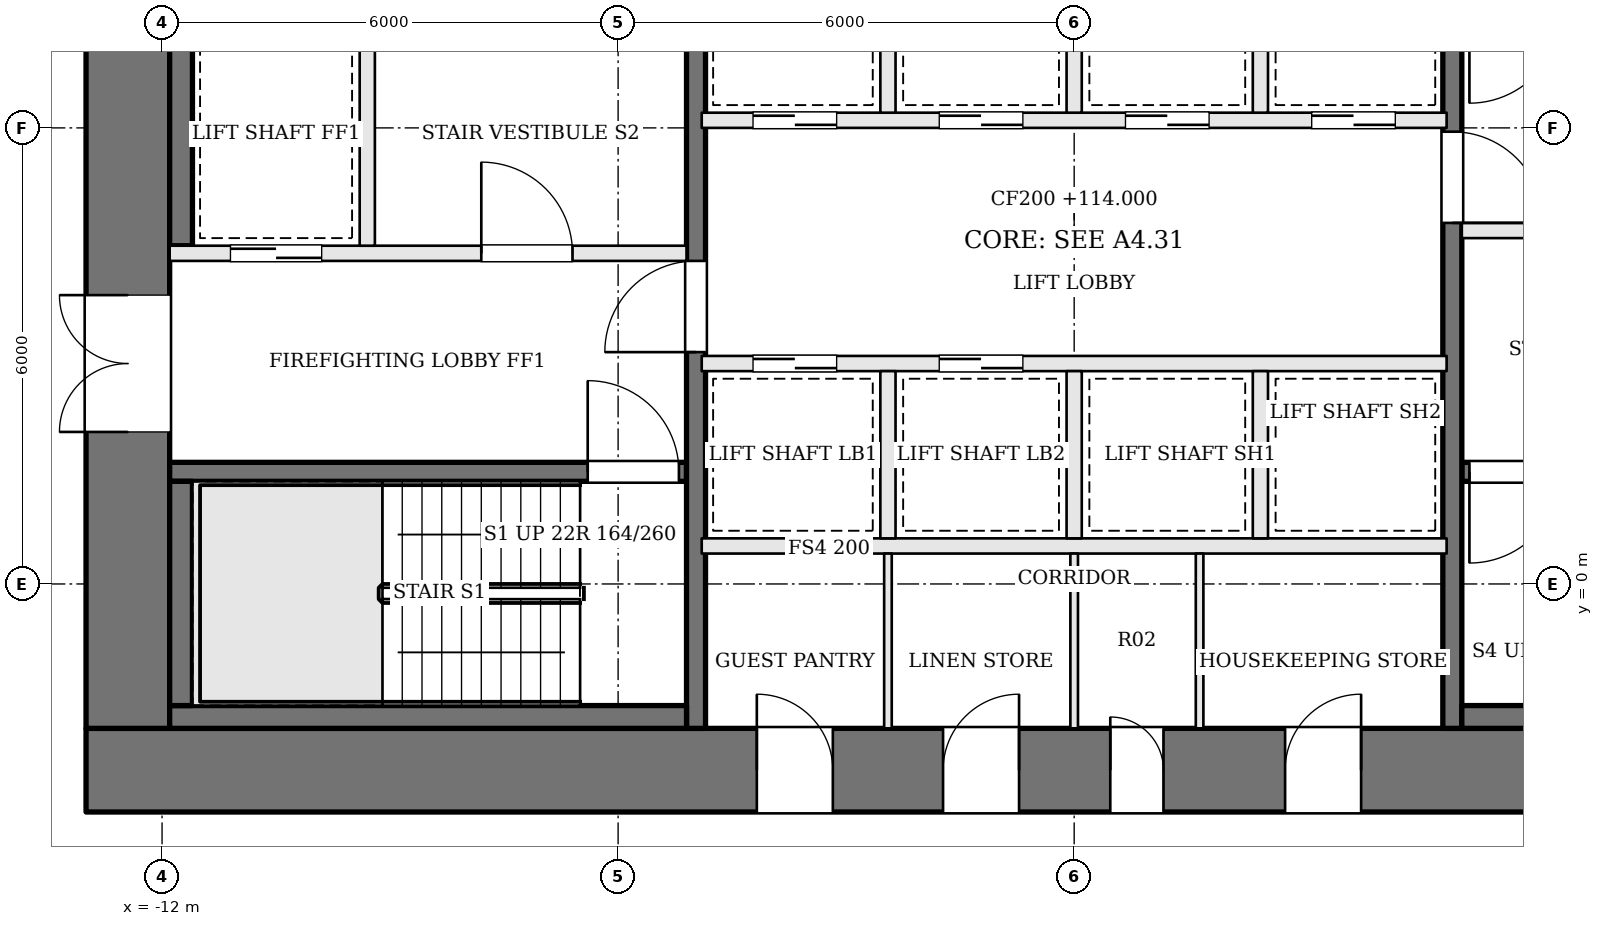
"""IFC4 building model, lengths in metres.
Left out: names, types, materials, properties, quantities, classifications, styles, units other than length and angle.
Written with IfcOpenShell. Run it as: python <this file> out.ifc"""

import sys

from ifc_helpers import new_model, si_unit, direction, frame, frame_2d, origin, place, context, subcontext, project, spatial, rectangle, extrude, element, fill, save


model = new_model("IFC4")
c1 = context("Model", 3, precision=1e-05, world=origin(), true_north=direction((0.0, 1.0)))
c2 = subcontext(c1, "Body", "Model", "MODEL_VIEW")
j1 = project(units=[si_unit("LENGTHUNIT", "METRE"), si_unit("PLANEANGLEUNIT", "RADIAN")], contexts=[c1])
p1 = place(None, origin())
s1 = spatial("IfcSite", under=j1, at=p1, CompositionType="ELEMENT")
p2 = place(p1, origin())
s2 = spatial("IfcBuilding", under=s1, at=p2, CompositionType="ELEMENT")
p3 = place(p2, frame((0.0, 0.0, 114.0)))
s3 = spatial("IfcBuildingStorey", under=s2, at=p3, CompositionType="ELEMENT", Elevation=114.0)
p4 = place(p3, frame((-13.0, -2.45, 0.0), z_axis=(0.0, 0.0, 1.0), x_axis=(1.0, 0.0, 0.0)))
e1 = element("IfcWall", 1, at=p4, inside=s3, PredefinedType="SHEAR", context=c2, shape_type="SweptSolid", body=[
    extrude(rectangle(XDim=26.0, YDim=1.1, at=frame_2d((13.0, 0.0))), origin(), (0.0, 0.0, 1.0), 3.6),
])
p5 = place(p4, frame((8.825, 0.0, 0.0)))
e2 = element("IfcOpeningElement", 2, at=p5, cuts=e1, PredefinedType="OPENING", context=c2, shape_type="SweptSolid", body=[
    extrude(rectangle(XDim=1.0, YDim=2.1, at=frame_2d((0.5, 1.05))), frame((0.0, 0.56, 0.0), z_axis=(0.0, -1.0, 0.0), x_axis=(1.0, 0.0, 0.0)), (0.0, 0.0, 1.0), 1.12),
])
p6 = place(p4, frame((11.275, 0.0, 0.0)))
e3 = element("IfcOpeningElement", 3, at=p6, cuts=e1, PredefinedType="OPENING", context=c2, shape_type="SweptSolid", body=[
    extrude(rectangle(XDim=1.0, YDim=2.1, at=frame_2d((0.5, 1.05))), frame((0.0, 0.56, 0.0), z_axis=(0.0, -1.0, 0.0), x_axis=(1.0, 0.0, 0.0)), (0.0, 0.0, 1.0), 1.12),
])
p7 = place(p4, frame((13.475, 0.0, 0.0)))
e4 = element("IfcOpeningElement", 4, at=p7, cuts=e1, PredefinedType="OPENING", context=c2, shape_type="SweptSolid", body=[
    extrude(rectangle(XDim=0.7, YDim=2.1, at=frame_2d((0.35, 1.05))), frame((0.0, 0.56, 0.0), z_axis=(0.0, -1.0, 0.0), x_axis=(1.0, 0.0, 0.0)), (0.0, 0.0, 1.0), 1.12),
])
p8 = place(p4, frame((15.775, 0.0, 0.0)))
e5 = element("IfcOpeningElement", 5, at=p8, cuts=e1, PredefinedType="OPENING", context=c2, shape_type="SweptSolid", body=[
    extrude(rectangle(XDim=1.0, YDim=2.1, at=frame_2d((0.5, 1.05))), frame((0.0, 0.56, 0.0), z_axis=(0.0, -1.0, 0.0), x_axis=(1.0, 0.0, 0.0)), (0.0, 0.0, 1.0), 1.12),
])
p9 = place(p3, frame((-12.45, -1.9, 0.0), z_axis=(0.0, 0.0, 1.0), x_axis=(0.0, 1.0, 0.0)))
e6 = element("IfcWall", 6, at=p9, inside=s3, PredefinedType="SHEAR", context=c2, shape_type="SweptSolid", body=[
    extrude(rectangle(XDim=12.8, YDim=1.1, at=frame_2d((6.4, 0.0))), origin(), (0.0, 0.0, 1.0), 3.6),
])
p10 = place(p9, frame((3.9, 0.0, 0.0)))
e7 = element("IfcOpeningElement", 7, at=p10, cuts=e6, PredefinedType="OPENING", context=c2, shape_type="SweptSolid", body=[
    extrude(rectangle(XDim=1.8, YDim=2.1, at=frame_2d((0.9, 1.05))), frame((0.0, 0.56, 0.0), z_axis=(0.0, -1.0, 0.0), x_axis=(1.0, 0.0, 0.0)), (0.0, 0.0, 1.0), 1.12),
])
p11 = place(p3, frame((-11.9, 1.475, 0.0), z_axis=(0.0, 0.0, 1.0), x_axis=(1.0, 0.0, 0.0)))
e8 = element("IfcWall", 8, at=p11, inside=s3, PredefinedType="SOLIDWALL", context=c2, shape_type="SweptSolid", body=[
    extrude(rectangle(XDim=6.8, YDim=0.25, at=frame_2d((3.4, 0.0))), origin(), (0.0, 0.0, 1.0), 3.4),
])
p12 = place(p11, frame((5.5, 0.0, 0.0)))
e9 = element("IfcOpeningElement", 9, at=p12, cuts=e8, PredefinedType="OPENING", context=c2, shape_type="SweptSolid", body=[
    extrude(rectangle(XDim=1.2, YDim=2.1, at=frame_2d((0.6, 1.05))), frame((0.0, 0.135, 0.0), z_axis=(0.0, -1.0, 0.0), x_axis=(1.0, 0.0, 0.0)), (0.0, 0.0, 1.0), 0.27),
])
p13 = place(p3, frame((-11.9, 4.35, 0.0), z_axis=(0.0, 0.0, 1.0), x_axis=(1.0, 0.0, 0.0)))
e10 = element("IfcWall", 10, at=p13, inside=s3, PredefinedType="SOLIDWALL", context=c2, shape_type="SweptSolid", body=[
    extrude(rectangle(XDim=6.8, YDim=0.2, at=frame_2d((3.4, 0.0))), origin(), (0.0, 0.0, 1.0), 3.4),
])
p14 = place(p13, frame((4.1, 0.0, 0.0)))
e11 = element("IfcOpeningElement", 11, at=p14, cuts=e10, PredefinedType="OPENING", context=c2, shape_type="SweptSolid", body=[
    extrude(rectangle(XDim=1.2, YDim=2.1, at=frame_2d((0.6, 1.05))), frame((0.0, 0.11, 0.0), z_axis=(0.0, -1.0, 0.0), x_axis=(1.0, 0.0, 0.0)), (0.0, 0.0, 1.0), 0.22),
])
p15 = place(p13, frame((0.8, 0.0, 0.0)))
e12 = element("IfcOpeningElement", 12, at=p15, cuts=e10, PredefinedType="OPENING", context=c2, shape_type="SweptSolid", body=[
    extrude(rectangle(XDim=1.2, YDim=2.1, at=frame_2d((0.6, 1.05))), frame((0.0, 0.11, 0.0), z_axis=(0.0, -1.0, 0.0), x_axis=(1.0, 0.0, 0.0)), (0.0, 0.0, 1.0), 0.22),
])
p16 = place(p3, frame((11.9, 4.65, 0.0), z_axis=(0.0, 0.0, 1.0), x_axis=(-1.0, 0.0, 0.0)))
e13 = element("IfcWall", 13, at=p16, inside=s3, PredefinedType="SOLIDWALL", context=c2, shape_type="SweptSolid", body=[
    extrude(rectangle(XDim=6.8, YDim=0.2, at=frame_2d((3.4, 0.0))), origin(), (0.0, 0.0, 1.0), 3.4),
])
p17 = place(p16, frame((4.1, 0.0, 0.0)))
e14 = element("IfcOpeningElement", 14, at=p17, cuts=e13, PredefinedType="OPENING", context=c2, shape_type="SweptSolid", body=[
    extrude(rectangle(XDim=1.2, YDim=2.1, at=frame_2d((0.6, 1.05))), frame((0.0, 0.11, 0.0), z_axis=(0.0, -1.0, 0.0), x_axis=(1.0, 0.0, 0.0)), (0.0, 0.0, 1.0), 0.22),
])
p18 = place(p16, frame((0.8, 0.0, 0.0)))
e15 = element("IfcOpeningElement", 15, at=p18, cuts=e13, PredefinedType="OPENING", context=c2, shape_type="SweptSolid", body=[
    extrude(rectangle(XDim=1.2, YDim=2.1, at=frame_2d((0.6, 1.05))), frame((0.0, 0.11, 0.0), z_axis=(0.0, -1.0, 0.0), x_axis=(1.0, 0.0, 0.0)), (0.0, 0.0, 1.0), 0.22),
])
p19 = place(p3, frame((11.9, 1.475, 0.0), z_axis=(0.0, 0.0, 1.0), x_axis=(-1.0, 0.0, 0.0)))
e16 = element("IfcWall", 16, at=p19, inside=s3, PredefinedType="SOLIDWALL", context=c2, shape_type="SweptSolid", body=[
    extrude(rectangle(XDim=6.8, YDim=0.25, at=frame_2d((3.4, 0.0))), origin(), (0.0, 0.0, 1.0), 3.4),
])
p20 = place(p19, frame((5.5, 0.0, 0.0)))
e17 = element("IfcOpeningElement", 17, at=p20, cuts=e16, PredefinedType="OPENING", context=c2, shape_type="SweptSolid", body=[
    extrude(rectangle(XDim=1.2, YDim=2.1, at=frame_2d((0.6, 1.05))), frame((0.0, 0.135, 0.0), z_axis=(0.0, -1.0, 0.0), x_axis=(1.0, 0.0, 0.0)), (0.0, 0.0, 1.0), 0.27),
])
p21 = place(p3, frame((-9.3, 4.45, 0.0), z_axis=(0.0, 0.0, 1.0), x_axis=(0.0, 1.0, 0.0)))
e18 = element("IfcWall", 18, at=p21, inside=s3, PredefinedType="SOLIDWALL", context=c2, shape_type="SweptSolid", body=[
    extrude(rectangle(XDim=3.0, YDim=0.2, at=frame_2d((1.5, 0.0))), origin(), (0.0, 0.0, 1.0), 3.4),
])
p22 = place(p3, frame((-4.975, -1.9, 0.0), z_axis=(0.0, 0.0, 1.0), x_axis=(0.0, 1.0, 0.0)))
e19 = element("IfcWall", 19, at=p22, inside=s3, PredefinedType="SOLIDWALL", context=c2, shape_type="SweptSolid", body=[
    extrude(rectangle(XDim=12.8, YDim=0.25, at=frame_2d((6.4, 0.0))), origin(), (0.0, 0.0, 1.0), 3.4),
])
p23 = place(p22, frame((4.95, 0.0, 0.0)))
e20 = element("IfcOpeningElement", 20, at=p23, cuts=e19, PredefinedType="OPENING", context=c2, shape_type="SweptSolid", body=[
    extrude(rectangle(XDim=1.2, YDim=2.1, at=frame_2d((0.6, 1.05))), frame((0.0, 0.135, 0.0), z_axis=(0.0, -1.0, 0.0), x_axis=(1.0, 0.0, 0.0)), (0.0, 0.0, 1.0), 0.27),
])
p24 = place(p3, frame((4.975, 10.9, 0.0), z_axis=(0.0, 0.0, 1.0), x_axis=(0.0, -1.0, 0.0)))
e21 = element("IfcWall", 21, at=p24, inside=s3, PredefinedType="SOLIDWALL", context=c2, shape_type="SweptSolid", body=[
    extrude(rectangle(XDim=12.8, YDim=0.25, at=frame_2d((6.4, 0.0))), origin(), (0.0, 0.0, 1.0), 3.4),
])
p25 = place(p24, frame((4.95, 0.0, 0.0)))
e22 = element("IfcOpeningElement", 22, at=p25, cuts=e21, PredefinedType="OPENING", context=c2, shape_type="SweptSolid", body=[
    extrude(rectangle(XDim=1.2, YDim=2.1, at=frame_2d((0.6, 1.05))), frame((0.0, 0.135, 0.0), z_axis=(0.0, -1.0, 0.0), x_axis=(1.0, 0.0, 0.0)), (0.0, 0.0, 1.0), 0.27),
])
p26 = place(p3, frame((-11.9, -1.75, 0.0), z_axis=(0.0, 0.0, 1.0), x_axis=(1.0, 0.0, 0.0)))
e23 = element("IfcWall", 23, at=p26, inside=s3, PredefinedType="SOLIDWALL", context=c2, shape_type="SweptSolid", body=[
    extrude(rectangle(XDim=6.8, YDim=0.3, at=frame_2d((3.4, 0.0))), origin(), (0.0, 0.0, 1.0), 3.4),
])
p27 = place(p3, frame((-11.75, -1.6, 0.0), z_axis=(0.0, 0.0, 1.0), x_axis=(0.0, 1.0, 0.0)))
e24 = element("IfcWall", 24, at=p27, inside=s3, PredefinedType="SOLIDWALL", context=c2, shape_type="SweptSolid", body=[
    extrude(rectangle(XDim=2.95, YDim=0.3, at=frame_2d((1.475, 0.0))), origin(), (0.0, 0.0, 1.0), 3.4),
])
p28 = place(p3, frame((-11.75, 4.45, 0.0), z_axis=(0.0, 0.0, 1.0), x_axis=(0.0, 1.0, 0.0)))
e25 = element("IfcWall", 25, at=p28, inside=s3, PredefinedType="SOLIDWALL", context=c2, shape_type="SweptSolid", body=[
    extrude(rectangle(XDim=3.0, YDim=0.3, at=frame_2d((1.5, 0.0))), origin(), (0.0, 0.0, 1.0), 3.4),
])
p29 = place(p3, frame((11.9, -1.75, 0.0), z_axis=(0.0, 0.0, 1.0), x_axis=(-1.0, 0.0, 0.0)))
e26 = element("IfcWall", 26, at=p29, inside=s3, PredefinedType="SOLIDWALL", context=c2, shape_type="SweptSolid", body=[
    extrude(rectangle(XDim=6.8, YDim=0.3, at=frame_2d((3.4, 0.0))), origin(), (0.0, 0.0, 1.0), 3.4),
])
p30 = place(p3, frame((-4.9, 0.5, 0.0), z_axis=(0.0, 0.0, 1.0), x_axis=(1.0, 0.0, 0.0)))
e27 = element("IfcWall", 27, at=p30, inside=s3, PredefinedType="SOLIDWALL", context=c2, shape_type="SweptSolid", body=[
    extrude(rectangle(XDim=9.8, YDim=0.2, at=frame_2d((4.9, 0.0))), origin(), (0.0, 0.0, 1.0), 3.4),
])
p31 = place(p3, frame((-4.9, 2.9, 0.0), z_axis=(0.0, 0.0, 1.0), x_axis=(1.0, 0.0, 0.0)))
e28 = element("IfcWall", 28, at=p31, inside=s3, PredefinedType="SOLIDWALL", context=c2, shape_type="SweptSolid", body=[
    extrude(rectangle(XDim=9.8, YDim=0.2, at=frame_2d((4.9, 0.0))), origin(), (0.0, 0.0, 1.0), 3.4),
])
p32 = place(p31, frame((0.675, 0.0, 0.0)))
e29 = element("IfcOpeningElement", 29, at=p32, cuts=e28, PredefinedType="OPENING", context=c2, shape_type="SweptSolid", body=[
    extrude(rectangle(XDim=1.1, YDim=2.1, at=frame_2d((0.55, 1.05))), frame((0.0, 0.11, 0.0), z_axis=(0.0, -1.0, 0.0), x_axis=(1.0, 0.0, 0.0)), (0.0, 0.0, 1.0), 0.22),
])
p33 = place(p31, frame((3.125, 0.0, 0.0)))
e30 = element("IfcOpeningElement", 30, at=p33, cuts=e28, PredefinedType="OPENING", context=c2, shape_type="SweptSolid", body=[
    extrude(rectangle(XDim=1.1, YDim=2.1, at=frame_2d((0.55, 1.05))), frame((0.0, 0.11, 0.0), z_axis=(0.0, -1.0, 0.0), x_axis=(1.0, 0.0, 0.0)), (0.0, 0.0, 1.0), 0.22),
])
p34 = place(p3, frame((-4.9, 6.1, 0.0), z_axis=(0.0, 0.0, 1.0), x_axis=(1.0, 0.0, 0.0)))
e31 = element("IfcWall", 31, at=p34, inside=s3, PredefinedType="SOLIDWALL", context=c2, shape_type="SweptSolid", body=[
    extrude(rectangle(XDim=9.8, YDim=0.2, at=frame_2d((4.9, 0.0))), origin(), (0.0, 0.0, 1.0), 3.4),
])
p35 = place(p34, frame((0.675, 0.0, 0.0)))
e32 = element("IfcOpeningElement", 32, at=p35, cuts=e31, PredefinedType="OPENING", context=c2, shape_type="SweptSolid", body=[
    extrude(rectangle(XDim=1.1, YDim=2.1, at=frame_2d((0.55, 1.05))), frame((0.0, 0.11, 0.0), z_axis=(0.0, -1.0, 0.0), x_axis=(1.0, 0.0, 0.0)), (0.0, 0.0, 1.0), 0.22),
])
p36 = place(p34, frame((3.125, 0.0, 0.0)))
e33 = element("IfcOpeningElement", 33, at=p36, cuts=e31, PredefinedType="OPENING", context=c2, shape_type="SweptSolid", body=[
    extrude(rectangle(XDim=1.1, YDim=2.1, at=frame_2d((0.55, 1.05))), frame((0.0, 0.11, 0.0), z_axis=(0.0, -1.0, 0.0), x_axis=(1.0, 0.0, 0.0)), (0.0, 0.0, 1.0), 0.22),
])
p37 = place(p34, frame((5.575, 0.0, 0.0)))
e34 = element("IfcOpeningElement", 34, at=p37, cuts=e31, PredefinedType="OPENING", context=c2, shape_type="SweptSolid", body=[
    extrude(rectangle(XDim=1.1, YDim=2.1, at=frame_2d((0.55, 1.05))), frame((0.0, 0.11, 0.0), z_axis=(0.0, -1.0, 0.0), x_axis=(1.0, 0.0, 0.0)), (0.0, 0.0, 1.0), 0.22),
])
p38 = place(p34, frame((8.025, 0.0, 0.0)))
e35 = element("IfcOpeningElement", 35, at=p38, cuts=e31, PredefinedType="OPENING", context=c2, shape_type="SweptSolid", body=[
    extrude(rectangle(XDim=1.1, YDim=2.1, at=frame_2d((0.55, 1.05))), frame((0.0, 0.11, 0.0), z_axis=(0.0, -1.0, 0.0), x_axis=(1.0, 0.0, 0.0)), (0.0, 0.0, 1.0), 0.22),
])
for number, where, z_axis, x_axis in (
    (36, (-2.45, 0.6, 0.0), (0.0, 0.0, 1.0), (0.0, 1.0, 0.0)),
    (37, (0.0, 0.6, 0.0), (0.0, 0.0, 1.0), (0.0, 1.0, 0.0)),
    (38, (2.45, 0.6, 0.0), (0.0, 0.0, 1.0), (0.0, 1.0, 0.0)),
    (39, (-2.45, 6.2, 0.0), (0.0, 0.0, 1.0), (0.0, 1.0, 0.0)),
    (40, (0.0, 6.2, 0.0), (0.0, 0.0, 1.0), (0.0, 1.0, 0.0)),
    (41, (2.45, 6.2, 0.0), (0.0, 0.0, 1.0), (0.0, 1.0, 0.0)),
):
    element("IfcWall", number, at=place(p3, frame(where, z_axis=z_axis, x_axis=x_axis)), inside=s3, PredefinedType="SOLIDWALL", context=c2, shape_type="SweptSolid", body=[
        extrude(rectangle(XDim=2.2, YDim=0.2, at=frame_2d((1.1, 0.0))), origin(), (0.0, 0.0, 1.0), 3.4),
    ])
for number, where, z_axis, x_axis in (
    (42, (-2.45, -1.9, 0.0), (0.0, 0.0, 1.0), (0.0, 1.0, 0.0)),
    (43, (0.0, -1.9, 0.0), (0.0, 0.0, 1.0), (0.0, 1.0, 0.0)),
    (44, (1.65, -1.9, 0.0), (0.0, 0.0, 1.0), (0.0, 1.0, 0.0)),
):
    element("IfcWall", number, at=place(p3, frame(where, z_axis=z_axis, x_axis=x_axis)), inside=s3, PredefinedType="PARTITIONING", context=c2, shape_type="SweptSolid", body=[
        extrude(rectangle(XDim=2.3, YDim=0.1, at=frame_2d((1.15, 0.0))), origin(), (0.0, 0.0, 1.0), 3.4),
    ])
p39 = place(p10, origin())
e45 = element("IfcDoor", 45, at=p39, inside=s3, OperationType="DOUBLE_DOOR_SINGLE_SWING", PredefinedType="DOOR", context=c2, shape_type="SweptSolid", body=[
    extrude(rectangle(XDim=1.8, YDim=2.1, at=frame_2d((0.9, 1.05))), frame((0.0, 0.025, 0.0), z_axis=(0.0, -1.0, 0.0), x_axis=(1.0, 0.0, 0.0)), (0.0, 0.0, 1.0), 0.05),
])
fill(e7, e45)
p40 = place(p23, origin())
e46 = element("IfcDoor", 46, at=p40, inside=s3, OperationType="SINGLE_SWING_LEFT", PredefinedType="DOOR", context=c2, shape_type="SweptSolid", body=[
    extrude(rectangle(XDim=1.2, YDim=2.1, at=frame_2d((0.6, 1.05))), frame((0.0, 0.025, 0.0), z_axis=(0.0, -1.0, 0.0), x_axis=(1.0, 0.0, 0.0)), (0.0, 0.0, 1.0), 0.05),
])
fill(e20, e46)
p41 = place(p25, origin())
e47 = element("IfcDoor", 47, at=p41, inside=s3, OperationType="SINGLE_SWING_RIGHT", PredefinedType="DOOR", context=c2, shape_type="SweptSolid", body=[
    extrude(rectangle(XDim=1.2, YDim=2.1, at=frame_2d((0.6, 1.05))), frame((0.0, 0.025, 0.0), z_axis=(0.0, -1.0, 0.0), x_axis=(1.0, 0.0, 0.0)), (0.0, 0.0, 1.0), 0.05),
])
fill(e22, e47)
p42 = place(p14, origin())
e48 = element("IfcDoor", 48, at=p42, inside=s3, OperationType="SINGLE_SWING_LEFT", PredefinedType="DOOR", context=c2, shape_type="SweptSolid", body=[
    extrude(rectangle(XDim=1.2, YDim=2.1, at=frame_2d((0.6, 1.05))), frame((0.0, 0.025, 0.0), z_axis=(0.0, -1.0, 0.0), x_axis=(1.0, 0.0, 0.0)), (0.0, 0.0, 1.0), 0.05),
])
fill(e11, e48)
p43 = place(p12, origin())
e49 = element("IfcDoor", 49, at=p43, inside=s3, OperationType="SINGLE_SWING_LEFT", PredefinedType="DOOR", context=c2, shape_type="SweptSolid", body=[
    extrude(rectangle(XDim=1.2, YDim=2.1, at=frame_2d((0.6, 1.05))), frame((0.0, 0.025, 0.0), z_axis=(0.0, -1.0, 0.0), x_axis=(1.0, 0.0, 0.0)), (0.0, 0.0, 1.0), 0.05),
])
fill(e9, e49)
p44 = place(p20, origin())
e50 = element("IfcDoor", 50, at=p44, inside=s3, OperationType="SINGLE_SWING_RIGHT", PredefinedType="DOOR", context=c2, shape_type="SweptSolid", body=[
    extrude(rectangle(XDim=1.2, YDim=2.1, at=frame_2d((0.6, 1.05))), frame((0.0, 0.025, 0.0), z_axis=(0.0, -1.0, 0.0), x_axis=(1.0, 0.0, 0.0)), (0.0, 0.0, 1.0), 0.05),
])
fill(e17, e50)
p45 = place(p15, origin())
e51 = element("IfcDoor", 51, at=p45, inside=s3, OperationType="SLIDING_TO_RIGHT", PredefinedType="DOOR", context=c2, shape_type="SweptSolid", body=[
    extrude(rectangle(XDim=1.2, YDim=2.1, at=frame_2d((0.6, 1.05))), frame((0.0, 0.025, 0.0), z_axis=(0.0, -1.0, 0.0), x_axis=(1.0, 0.0, 0.0)), (0.0, 0.0, 1.0), 0.05),
])
fill(e12, e51)
p46 = place(p32, origin())
e52 = element("IfcDoor", 52, at=p46, inside=s3, OperationType="SLIDING_TO_RIGHT", PredefinedType="DOOR", context=c2, shape_type="SweptSolid", body=[
    extrude(rectangle(XDim=1.1, YDim=2.1, at=frame_2d((0.55, 1.05))), frame((0.0, 0.025, 0.0), z_axis=(0.0, -1.0, 0.0), x_axis=(1.0, 0.0, 0.0)), (0.0, 0.0, 1.0), 0.05),
])
fill(e29, e52)
p47 = place(p33, origin())
e53 = element("IfcDoor", 53, at=p47, inside=s3, OperationType="SLIDING_TO_LEFT", PredefinedType="DOOR", context=c2, shape_type="SweptSolid", body=[
    extrude(rectangle(XDim=1.1, YDim=2.1, at=frame_2d((0.55, 1.05))), frame((0.0, 0.025, 0.0), z_axis=(0.0, -1.0, 0.0), x_axis=(1.0, 0.0, 0.0)), (0.0, 0.0, 1.0), 0.05),
])
fill(e30, e53)
p48 = place(p35, origin())
e54 = element("IfcDoor", 54, at=p48, inside=s3, OperationType="SLIDING_TO_RIGHT", PredefinedType="DOOR", context=c2, shape_type="SweptSolid", body=[
    extrude(rectangle(XDim=1.1, YDim=2.1, at=frame_2d((0.55, 1.05))), frame((0.0, 0.025, 0.0), z_axis=(0.0, -1.0, 0.0), x_axis=(1.0, 0.0, 0.0)), (0.0, 0.0, 1.0), 0.05),
])
fill(e32, e54)
p49 = place(p36, origin())
e55 = element("IfcDoor", 55, at=p49, inside=s3, OperationType="SLIDING_TO_LEFT", PredefinedType="DOOR", context=c2, shape_type="SweptSolid", body=[
    extrude(rectangle(XDim=1.1, YDim=2.1, at=frame_2d((0.55, 1.05))), frame((0.0, 0.025, 0.0), z_axis=(0.0, -1.0, 0.0), x_axis=(1.0, 0.0, 0.0)), (0.0, 0.0, 1.0), 0.05),
])
fill(e33, e55)
p50 = place(p37, origin())
e56 = element("IfcDoor", 56, at=p50, inside=s3, OperationType="SLIDING_TO_RIGHT", PredefinedType="DOOR", context=c2, shape_type="SweptSolid", body=[
    extrude(rectangle(XDim=1.1, YDim=2.1, at=frame_2d((0.55, 1.05))), frame((0.0, 0.025, 0.0), z_axis=(0.0, -1.0, 0.0), x_axis=(1.0, 0.0, 0.0)), (0.0, 0.0, 1.0), 0.05),
])
fill(e34, e56)
p51 = place(p38, origin())
e57 = element("IfcDoor", 57, at=p51, inside=s3, OperationType="SLIDING_TO_LEFT", PredefinedType="DOOR", context=c2, shape_type="SweptSolid", body=[
    extrude(rectangle(XDim=1.1, YDim=2.1, at=frame_2d((0.55, 1.05))), frame((0.0, 0.025, 0.0), z_axis=(0.0, -1.0, 0.0), x_axis=(1.0, 0.0, 0.0)), (0.0, 0.0, 1.0), 0.05),
])
fill(e35, e57)
p52 = place(p5, origin())
e58 = element("IfcDoor", 58, at=p52, inside=s3, OperationType="SINGLE_SWING_LEFT", PredefinedType="DOOR", context=c2, shape_type="SweptSolid", body=[
    extrude(rectangle(XDim=1.0, YDim=2.1, at=frame_2d((0.5, 1.05))), frame((0.0, 0.025, 0.0), z_axis=(0.0, -1.0, 0.0), x_axis=(1.0, 0.0, 0.0)), (0.0, 0.0, 1.0), 0.05),
])
fill(e2, e58)
p53 = place(p6, origin())
e59 = element("IfcDoor", 59, at=p53, inside=s3, OperationType="SINGLE_SWING_RIGHT", PredefinedType="DOOR", context=c2, shape_type="SweptSolid", body=[
    extrude(rectangle(XDim=1.0, YDim=2.1, at=frame_2d((0.5, 1.05))), frame((0.0, 0.025, 0.0), z_axis=(0.0, -1.0, 0.0), x_axis=(1.0, 0.0, 0.0)), (0.0, 0.0, 1.0), 0.05),
])
fill(e3, e59)
p54 = place(p7, origin())
e60 = element("IfcDoor", 60, at=p54, inside=s3, OperationType="SINGLE_SWING_LEFT", PredefinedType="DOOR", context=c2, shape_type="SweptSolid", body=[
    extrude(rectangle(XDim=0.7, YDim=2.1, at=frame_2d((0.35, 1.05))), frame((0.0, 0.025, 0.0), z_axis=(0.0, -1.0, 0.0), x_axis=(1.0, 0.0, 0.0)), (0.0, 0.0, 1.0), 0.05),
])
fill(e4, e60)
p55 = place(p8, origin())
e61 = element("IfcDoor", 61, at=p55, inside=s3, OperationType="SINGLE_SWING_RIGHT", PredefinedType="DOOR", context=c2, shape_type="SweptSolid", body=[
    extrude(rectangle(XDim=1.0, YDim=2.1, at=frame_2d((0.5, 1.05))), frame((0.0, 0.025, 0.0), z_axis=(0.0, -1.0, 0.0), x_axis=(1.0, 0.0, 0.0)), (0.0, 0.0, 1.0), 0.05),
])
fill(e5, e61)
save(model, sys.argv[1])
